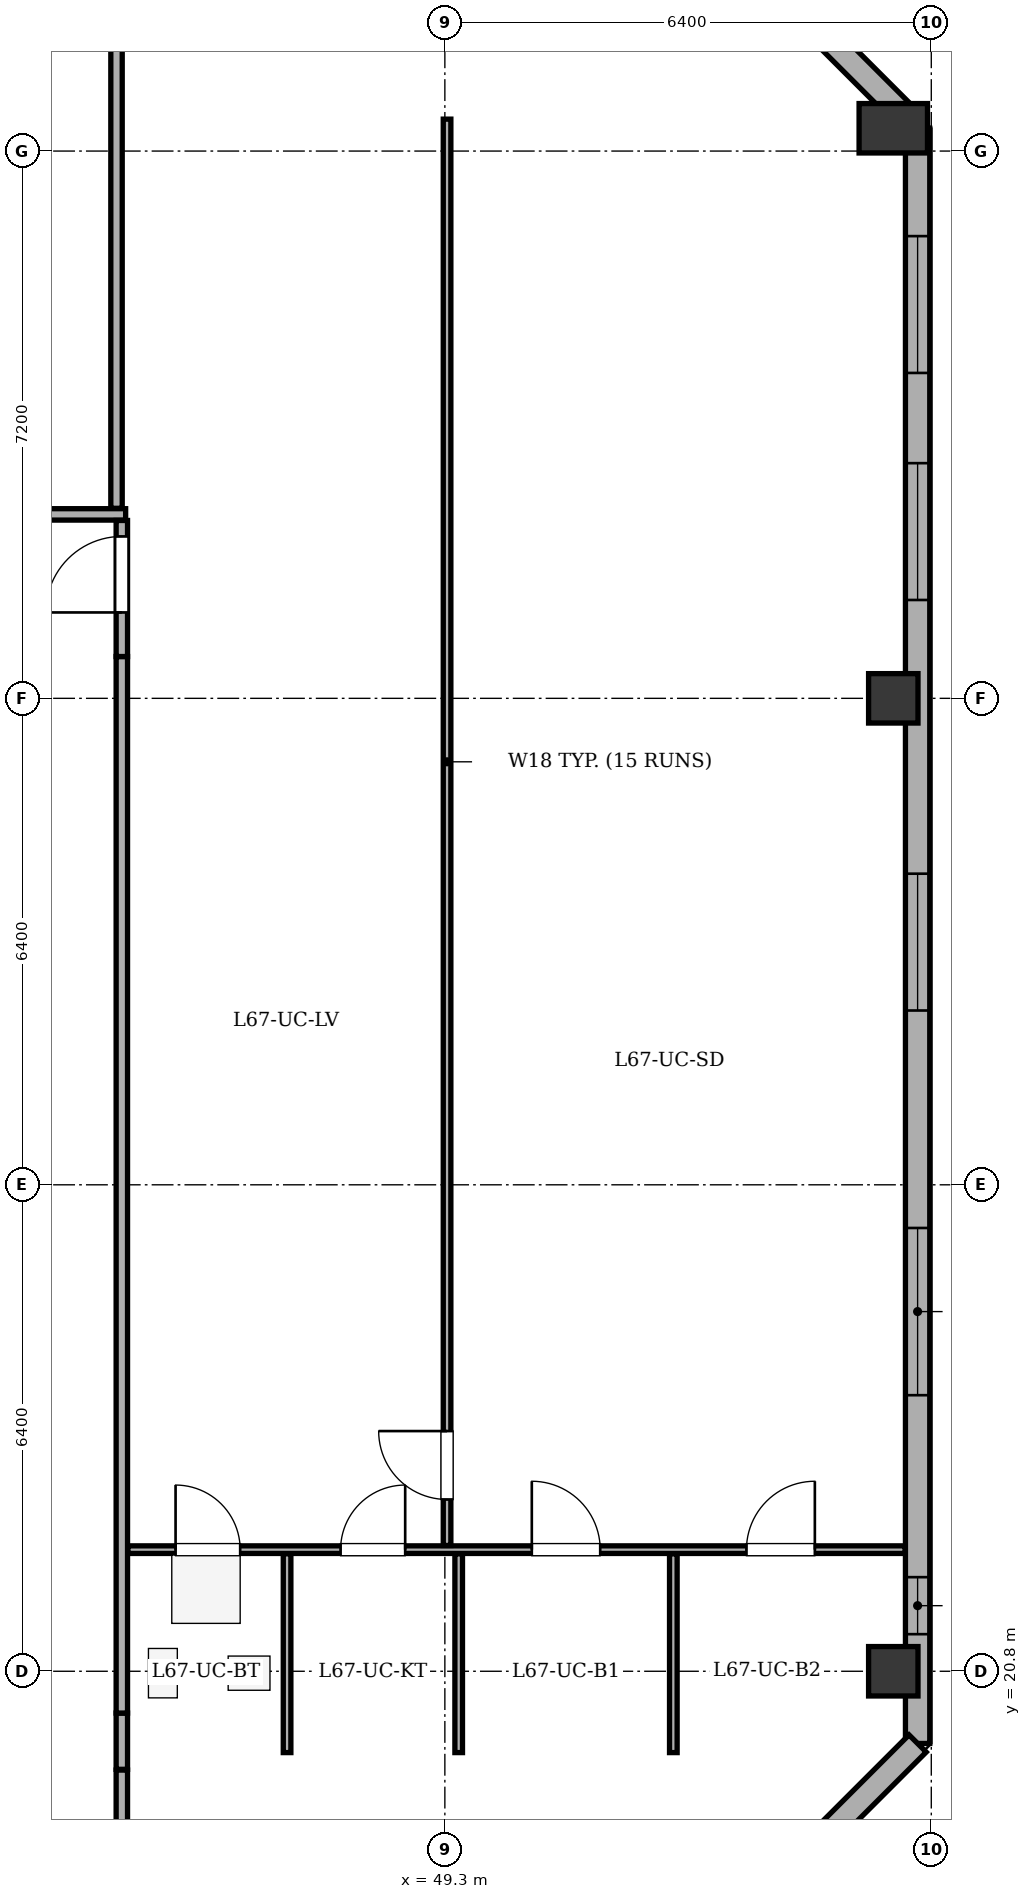
"""IFC4 building model, lengths in metres.
Left out: names, types, materials, properties, quantities, classifications, styles, units other than length and angle.
Written with IfcOpenShell. Run it as: python <this file> out.ifc"""

import sys

from ifc_helpers import new_model, si_unit, direction, frame, frame_2d, origin, origin_2d, place, context, subcontext, project, spatial, rectangle, extrude, element, fill, save


model = new_model("IFC4")
c1 = context("Model", 3, precision=1e-05, world=origin(), true_north=direction((0.0, 1.0)))
c2 = subcontext(c1, "Body", "Model", "MODEL_VIEW")
j1 = project(units=[si_unit("LENGTHUNIT", "METRE"), si_unit("PLANEANGLEUNIT", "RADIAN")], contexts=[c1])
p1 = place(None, origin())
s1 = spatial("IfcSite", under=j1, at=p1, CompositionType="ELEMENT")
p2 = place(p1, origin())
s2 = spatial("IfcBuilding", under=s1, at=p2, CompositionType="ELEMENT")
p3 = place(p2, frame((0.0, 0.0, 255.1)))
s3 = spatial("IfcBuildingStorey", under=s2, at=p3, CompositionType="ELEMENT", Elevation=255.1)
for number, where, z_axis, x_axis in (
    (1, (55.2, 20.8, 0.0), (0.0, 0.0, 1.0), (1.0, 0.0, 0.0)),
    (2, (55.2, 33.6, 0.0), (0.0, 0.0, 1.0), (1.0, 0.0, 0.0)),
):
    element("IfcColumn", number, at=place(p3, frame(where, z_axis=z_axis, x_axis=x_axis)), inside=s3, PredefinedType="COLUMN", context=c2, shape_type="SweptSolid", body=[
        extrude(rectangle(XDim=0.65, YDim=0.65, at=origin_2d()), origin(), (0.0, 0.0, 1.0), 3.4),
    ])
p4 = place(p3, frame((55.2, 41.1, 0.0), z_axis=(0.0, 0.0, 1.0), x_axis=(1.0, 0.0, 0.0)))
e3 = element("IfcColumn", 3, at=p4, inside=s3, PredefinedType="COLUMN", context=c2, shape_type="SweptSolid", body=[
    extrude(rectangle(XDim=0.65, YDim=0.9, at=origin_2d()), origin(), (0.0, 0.0, 1.0), 3.4),
])
p5 = place(p3, frame((51.7, 44.92, 0.0), z_axis=(0.0, 0.0, 1.0), x_axis=(0.70712937715, -0.707084184501, 0.0)))
e4 = element("IfcWall", 4, at=p5, inside=s3, PredefinedType="STANDARD", context=c2, shape_type="SweptSolid", body=[
    extrude(rectangle(XDim=5.402, YDim=0.32, at=frame_2d((2.701, 0.0))), origin(), (0.0, 0.0, 1.0), 2.725),
])
p6 = place(p5, frame((2.001, 0.0, 0.75)))
e5 = element("IfcOpeningElement", 5, at=p6, cuts=e4, PredefinedType="OPENING", context=c2, shape_type="SweptSolid", body=[
    extrude(rectangle(XDim=1.4, YDim=1.65, at=frame_2d((0.7, 0.825))), frame((0.0, 0.17, 0.0), z_axis=(0.0, -1.0, 0.0), x_axis=(1.0, 0.0, 0.0)), (0.0, 0.0, 1.0), 0.34),
])
p7 = place(p3, frame((55.52, 41.1, 0.0), z_axis=(0.0, 0.0, 1.0), x_axis=(0.0, -1.0, 0.0)))
e6 = element("IfcWall", 6, at=p7, inside=s3, PredefinedType="STANDARD", context=c2, shape_type="SweptSolid", body=[
    extrude(rectangle(XDim=21.25, YDim=0.32, at=frame_2d((10.625, 0.0))), origin(), (0.0, 0.0, 1.0), 2.725),
])
p8 = place(p7, frame((1.419, 0.0, 0.75)))
e7 = element("IfcOpeningElement", 7, at=p8, cuts=e6, PredefinedType="OPENING", context=c2, shape_type="SweptSolid", body=[
    extrude(rectangle(XDim=1.8, YDim=1.7, at=frame_2d((0.9, 0.85))), frame((0.0, 0.17, 0.0), z_axis=(0.0, -1.0, 0.0), x_axis=(1.0, 0.0, 0.0)), (0.0, 0.0, 1.0), 0.34),
])
p9 = place(p7, frame((4.406, 0.0, 0.75)))
e8 = element("IfcOpeningElement", 8, at=p9, cuts=e6, PredefinedType="OPENING", context=c2, shape_type="SweptSolid", body=[
    extrude(rectangle(XDim=1.8, YDim=1.7, at=frame_2d((0.9, 0.85))), frame((0.0, 0.17, 0.0), z_axis=(0.0, -1.0, 0.0), x_axis=(1.0, 0.0, 0.0)), (0.0, 0.0, 1.0), 0.34),
])
p10 = place(p7, frame((9.807, 0.0, 0.75)))
e9 = element("IfcOpeningElement", 9, at=p10, cuts=e6, PredefinedType="OPENING", context=c2, shape_type="SweptSolid", body=[
    extrude(rectangle(XDim=1.8, YDim=1.7, at=frame_2d((0.9, 0.85))), frame((0.0, 0.17, 0.0), z_axis=(0.0, -1.0, 0.0), x_axis=(1.0, 0.0, 0.0)), (0.0, 0.0, 1.0), 0.34),
])
p11 = place(p7, frame((14.468, 0.0, 0.75)))
e10 = element("IfcOpeningElement", 10, at=p11, cuts=e6, PredefinedType="OPENING", context=c2, shape_type="SweptSolid", body=[
    extrude(rectangle(XDim=2.2, YDim=1.7, at=frame_2d((1.1, 0.85))), frame((0.0, 0.17, 0.0), z_axis=(0.0, -1.0, 0.0), x_axis=(1.0, 0.0, 0.0)), (0.0, 0.0, 1.0), 0.34),
])
p12 = place(p7, frame((19.062, 0.0, 0.75)))
e11 = element("IfcOpeningElement", 11, at=p12, cuts=e6, PredefinedType="OPENING", context=c2, shape_type="SweptSolid", body=[
    extrude(rectangle(XDim=0.75, YDim=1.45, at=frame_2d((0.375, 0.725))), frame((0.0, 0.17, 0.0), z_axis=(0.0, -1.0, 0.0), x_axis=(1.0, 0.0, 0.0)), (0.0, 0.0, 1.0), 0.34),
])
p13 = place(p3, frame((55.52, 19.85, 0.0), z_axis=(0.0, 0.0, 1.0), x_axis=(-0.707106781187, -0.707106781187, 0.0)))
e12 = element("IfcWall", 12, at=p13, inside=s3, PredefinedType="STANDARD", context=c2, shape_type="SweptSolid", body=[
    extrude(rectangle(XDim=5.402, YDim=0.32, at=frame_2d((2.701, 0.0))), origin(), (0.0, 0.0, 1.0), 2.725),
])
p14 = place(p13, frame((2.001, 0.0, 0.75)))
e13 = element("IfcOpeningElement", 13, at=p14, cuts=e12, PredefinedType="OPENING", context=c2, shape_type="SweptSolid", body=[
    extrude(rectangle(XDim=1.4, YDim=1.65, at=frame_2d((0.7, 0.825))), frame((0.0, 0.17, 0.0), z_axis=(0.0, -1.0, 0.0), x_axis=(1.0, 0.0, 0.0)), (0.0, 0.0, 1.0), 0.34),
])
p15 = place(p3, frame((14.58, 36.02, 0.0), z_axis=(0.0, 0.0, 1.0), x_axis=(1.0, 0.0, 0.0)))
e14 = element("IfcWall", 14, at=p15, inside=s3, PredefinedType="PARTITIONING", context=c2, shape_type="SweptSolid", body=[
    extrude(rectangle(XDim=30.52, YDim=0.15, at=frame_2d((15.26, 0.0))), origin(), (0.0, 0.0, 1.0), 3.1),
])
p16 = place(p15, frame((6.585, 0.0, 0.0)))
e15 = element("IfcOpeningElement", 15, at=p16, cuts=e14, PredefinedType="OPENING", context=c2, shape_type="SweptSolid", body=[
    extrude(rectangle(XDim=1.0, YDim=2.1, at=frame_2d((0.5, 1.05))), frame((0.0, 0.085, 0.0), z_axis=(0.0, -1.0, 0.0), x_axis=(1.0, 0.0, 0.0)), (0.0, 0.0, 1.0), 0.17),
])
p17 = place(p15, frame((21.724, 0.0, 0.0)))
e16 = element("IfcOpeningElement", 16, at=p17, cuts=e14, PredefinedType="OPENING", context=c2, shape_type="SweptSolid", body=[
    extrude(rectangle(XDim=1.0, YDim=2.1, at=frame_2d((0.5, 1.05))), frame((0.0, 0.085, 0.0), z_axis=(0.0, -1.0, 0.0), x_axis=(1.0, 0.0, 0.0)), (0.0, 0.0, 1.0), 0.17),
])
p18 = place(p3, frame((44.98, 36.1, 0.0), z_axis=(0.0, 0.0, 1.0), x_axis=(0.0, 1.0, 0.0)))
e17 = element("IfcWall", 17, at=p18, inside=s3, PredefinedType="PARTITIONING", context=c2, shape_type="SweptSolid", body=[
    extrude(rectangle(XDim=8.655, YDim=0.15, at=frame_2d((4.327, 0.0))), origin(), (0.0, 0.0, 1.0), 2.725),
])
p19 = place(p3, frame((45.05, 19.5, 0.0), z_axis=(0.0, 0.0, 1.0), x_axis=(0.0, -1.0, 0.0)))
e18 = element("IfcWall", 18, at=p19, inside=s3, PredefinedType="PARTITIONING", context=c2, shape_type="SweptSolid", body=[
    extrude(rectangle(XDim=0.96, YDim=0.15, at=frame_2d((0.48, 0.0))), origin(), (0.0, 0.0, 1.0), 2.725),
])
p20 = place(p3, frame((45.05, 19.51, 0.0), z_axis=(0.0, 0.0, 1.0), x_axis=(0.0, 1.0, 0.0)))
e19 = element("IfcWall", 19, at=p20, inside=s3, PredefinedType="PARTITIONING", context=c2, shape_type="SweptSolid", body=[
    extrude(rectangle(XDim=0.74, YDim=0.15, at=frame_2d((0.37, 0.0))), origin(), (0.0, 0.0, 1.0), 2.725),
])
p21 = place(p3, frame((45.05, 20.25, 0.0), z_axis=(0.0, 0.0, 1.0), x_axis=(0.0, 1.0, 0.0)))
e20 = element("IfcWall", 20, at=p21, inside=s3, PredefinedType="PARTITIONING", context=c2, shape_type="SweptSolid", body=[
    extrude(rectangle(XDim=13.9, YDim=0.15, at=frame_2d((6.95, 0.0))), origin(), (0.0, 0.0, 1.0), 2.725),
])
p22 = place(p3, frame((45.05, 34.15, 0.0), z_axis=(0.0, 0.0, 1.0), x_axis=(0.0, 1.0, 0.0)))
e21 = element("IfcWall", 21, at=p22, inside=s3, PredefinedType="PARTITIONING", context=c2, shape_type="SweptSolid", body=[
    extrude(rectangle(XDim=1.79, YDim=0.15, at=frame_2d((0.895, 0.0))), origin(), (0.0, 0.0, 1.0), 2.725),
])
p23 = place(p22, frame((0.58, 0.0, 0.0)))
e22 = element("IfcOpeningElement", 22, at=p23, cuts=e21, PredefinedType="OPENING", context=c2, shape_type="SweptSolid", body=[
    extrude(rectangle(XDim=1.0, YDim=2.1, at=frame_2d((0.5, 1.05))), frame((0.0, 0.085, 0.0), z_axis=(0.0, -1.0, 0.0), x_axis=(1.0, 0.0, 0.0)), (0.0, 0.0, 1.0), 0.17),
])
p24 = place(p3, frame((45.13, 22.4, 0.0), z_axis=(0.0, 0.0, 1.0), x_axis=(1.0, 0.0, 0.0)))
e23 = element("IfcWall", 23, at=p24, inside=s3, PredefinedType="PARTITIONING", context=c2, shape_type="SweptSolid", body=[
    extrude(rectangle(XDim=10.225, YDim=0.1, at=frame_2d((5.113, 0.0))), origin(), (0.0, 0.0, 1.0), 3.1),
])
p25 = place(p24, frame((0.627, 0.0, 0.0)))
e24 = element("IfcOpeningElement", 24, at=p25, cuts=e23, PredefinedType="OPENING", context=c2, shape_type="SweptSolid", body=[
    extrude(rectangle(XDim=0.85, YDim=2.05, at=frame_2d((0.425, 1.025))), frame((0.0, 0.06, 0.0), z_axis=(0.0, -1.0, 0.0), x_axis=(1.0, 0.0, 0.0)), (0.0, 0.0, 1.0), 0.12),
])
p26 = place(p24, frame((2.798, 0.0, 0.0)))
e25 = element("IfcOpeningElement", 25, at=p26, cuts=e23, PredefinedType="OPENING", context=c2, shape_type="SweptSolid", body=[
    extrude(rectangle(XDim=0.85, YDim=2.05, at=frame_2d((0.425, 1.025))), frame((0.0, 0.06, 0.0), z_axis=(0.0, -1.0, 0.0), x_axis=(1.0, 0.0, 0.0)), (0.0, 0.0, 1.0), 0.12),
])
p27 = place(p24, frame((5.314, 0.0, 0.0)))
e26 = element("IfcOpeningElement", 26, at=p27, cuts=e23, PredefinedType="OPENING", context=c2, shape_type="SweptSolid", body=[
    extrude(rectangle(XDim=0.9, YDim=2.05, at=frame_2d((0.45, 1.025))), frame((0.0, 0.06, 0.0), z_axis=(0.0, -1.0, 0.0), x_axis=(1.0, 0.0, 0.0)), (0.0, 0.0, 1.0), 0.12),
])
p28 = place(p24, frame((8.138, 0.0, 0.0)))
e27 = element("IfcOpeningElement", 27, at=p28, cuts=e23, PredefinedType="OPENING", context=c2, shape_type="SweptSolid", body=[
    extrude(rectangle(XDim=0.9, YDim=2.05, at=frame_2d((0.45, 1.025))), frame((0.0, 0.06, 0.0), z_axis=(0.0, -1.0, 0.0), x_axis=(1.0, 0.0, 0.0)), (0.0, 0.0, 1.0), 0.12),
])
p29 = place(p3, frame((49.329, 22.455, 0.0), z_axis=(0.0, 0.0, 1.0), x_axis=(0.0, 1.0, 0.0)))
e28 = element("IfcWall", 28, at=p29, inside=s3, PredefinedType="PARTITIONING", context=c2, shape_type="SweptSolid", body=[
    extrude(rectangle(XDim=18.765, YDim=0.1, at=frame_2d((9.382, 0.0))), origin(), (0.0, 0.0, 1.0), 2.725),
])
p30 = place(p29, frame((0.605, 0.0, 0.0)))
e29 = element("IfcOpeningElement", 29, at=p30, cuts=e28, PredefinedType="OPENING", context=c2, shape_type="SweptSolid", body=[
    extrude(rectangle(XDim=0.9, YDim=2.05, at=frame_2d((0.45, 1.025))), frame((0.0, 0.06, 0.0), z_axis=(0.0, -1.0, 0.0), x_axis=(1.0, 0.0, 0.0)), (0.0, 0.0, 1.0), 0.12),
])
for number, where, z_axis, x_axis in (
    (30, (47.224, 19.73, 0.0), (0.0, 0.0, 1.0), (0.0, 1.0, 0.0)),
    (31, (49.482, 19.73, 0.0), (0.0, 0.0, 1.0), (0.0, 1.0, 0.0)),
):
    element("IfcWall", number, at=place(p3, frame(where, z_axis=z_axis, x_axis=x_axis)), inside=s3, PredefinedType="PARTITIONING", context=c2, shape_type="SweptSolid", body=[
        extrude(rectangle(XDim=2.615, YDim=0.1, at=frame_2d((1.308, 0.0))), origin(), (0.0, 0.0, 1.0), 2.725),
    ])
p31 = place(p3, frame((52.306, 19.73, 0.0), z_axis=(0.0, 0.0, 1.0), x_axis=(0.0, 1.0, 0.0)))
e32 = element("IfcWall", 32, at=p31, inside=s3, PredefinedType="PARTITIONING", context=c2, shape_type="SweptSolid", body=[
    extrude(rectangle(XDim=2.615, YDim=0.1, at=frame_2d((1.308, 0.0))), origin(), (0.0, 0.0, 1.0), 3.1),
])
p32 = place(p8, origin())
e33 = element("IfcWindow", 33, at=p32, inside=s3, PartitioningType="SINGLE_PANEL", PredefinedType="WINDOW", context=c2, shape_type="SweptSolid", body=[
    extrude(rectangle(XDim=1.8, YDim=1.7, at=frame_2d((0.9, 0.85))), frame((0.0, -0.01, 0.0), z_axis=(0.0, -1.0, 0.0), x_axis=(1.0, 0.0, 0.0)), (0.0, 0.0, 1.0), 0.06),
])
fill(e7, e33)
p33 = place(p9, origin())
e34 = element("IfcWindow", 34, at=p33, inside=s3, PartitioningType="SINGLE_PANEL", PredefinedType="WINDOW", context=c2, shape_type="SweptSolid", body=[
    extrude(rectangle(XDim=1.8, YDim=1.7, at=frame_2d((0.9, 0.85))), frame((0.0, -0.01, 0.0), z_axis=(0.0, -1.0, 0.0), x_axis=(1.0, 0.0, 0.0)), (0.0, 0.0, 1.0), 0.06),
])
fill(e8, e34)
p34 = place(p10, origin())
e35 = element("IfcWindow", 35, at=p34, inside=s3, PartitioningType="SINGLE_PANEL", PredefinedType="WINDOW", context=c2, shape_type="SweptSolid", body=[
    extrude(rectangle(XDim=1.8, YDim=1.7, at=frame_2d((0.9, 0.85))), frame((0.0, -0.01, 0.0), z_axis=(0.0, -1.0, 0.0), x_axis=(1.0, 0.0, 0.0)), (0.0, 0.0, 1.0), 0.06),
])
fill(e9, e35)
p35 = place(p11, origin())
e36 = element("IfcWindow", 36, at=p35, inside=s3, PartitioningType="SINGLE_PANEL", PredefinedType="WINDOW", context=c2, shape_type="SweptSolid", body=[
    extrude(rectangle(XDim=2.2, YDim=1.7, at=frame_2d((1.1, 0.85))), frame((0.0, -0.01, 0.0), z_axis=(0.0, -1.0, 0.0), x_axis=(1.0, 0.0, 0.0)), (0.0, 0.0, 1.0), 0.06),
])
fill(e10, e36)
p36 = place(p12, origin())
e37 = element("IfcWindow", 37, at=p36, inside=s3, PartitioningType="SINGLE_PANEL", PredefinedType="WINDOW", context=c2, shape_type="SweptSolid", body=[
    extrude(rectangle(XDim=0.75, YDim=1.45, at=frame_2d((0.375, 0.725))), frame((0.0, -0.01, 0.0), z_axis=(0.0, -1.0, 0.0), x_axis=(1.0, 0.0, 0.0)), (0.0, 0.0, 1.0), 0.06),
])
fill(e11, e37)
p37 = place(p23, origin())
e38 = element("IfcDoor", 38, at=p37, inside=s3, OperationType="SINGLE_SWING_LEFT", PredefinedType="DOOR", context=c2, shape_type="SweptSolid", body=[
    extrude(rectangle(XDim=1.0, YDim=2.1, at=frame_2d((0.5, 1.05))), frame((0.0, 0.025, 0.0), z_axis=(0.0, -1.0, 0.0), x_axis=(1.0, 0.0, 0.0)), (0.0, 0.0, 1.0), 0.05),
])
fill(e22, e38)
p38 = place(p30, origin())
e39 = element("IfcDoor", 39, at=p38, inside=s3, OperationType="SINGLE_SWING_RIGHT", PredefinedType="DOOR", context=c2, shape_type="SweptSolid", body=[
    extrude(rectangle(XDim=0.9, YDim=2.05, at=frame_2d((0.45, 1.025))), frame((0.0, 0.025, 0.0), z_axis=(0.0, -1.0, 0.0), x_axis=(1.0, 0.0, 0.0)), (0.0, 0.0, 1.0), 0.05),
])
fill(e29, e39)
p39 = place(p25, origin())
e40 = element("IfcDoor", 40, at=p39, inside=s3, OperationType="SINGLE_SWING_LEFT", PredefinedType="DOOR", context=c2, shape_type="SweptSolid", body=[
    extrude(rectangle(XDim=0.85, YDim=2.05, at=frame_2d((0.425, 1.025))), frame((0.0, 0.025, 0.0), z_axis=(0.0, -1.0, 0.0), x_axis=(1.0, 0.0, 0.0)), (0.0, 0.0, 1.0), 0.05),
])
fill(e24, e40)
p40 = place(p26, origin())
e41 = element("IfcDoor", 41, at=p40, inside=s3, OperationType="SINGLE_SWING_RIGHT", PredefinedType="DOOR", context=c2, shape_type="SweptSolid", body=[
    extrude(rectangle(XDim=0.85, YDim=2.05, at=frame_2d((0.425, 1.025))), frame((0.0, 0.025, 0.0), z_axis=(0.0, -1.0, 0.0), x_axis=(1.0, 0.0, 0.0)), (0.0, 0.0, 1.0), 0.05),
])
fill(e25, e41)
p41 = place(p27, origin())
e42 = element("IfcDoor", 42, at=p41, inside=s3, OperationType="SINGLE_SWING_LEFT", PredefinedType="DOOR", context=c2, shape_type="SweptSolid", body=[
    extrude(rectangle(XDim=0.9, YDim=2.05, at=frame_2d((0.45, 1.025))), frame((0.0, 0.025, 0.0), z_axis=(0.0, -1.0, 0.0), x_axis=(1.0, 0.0, 0.0)), (0.0, 0.0, 1.0), 0.05),
])
fill(e26, e42)
p42 = place(p28, origin())
e43 = element("IfcDoor", 43, at=p42, inside=s3, OperationType="SINGLE_SWING_RIGHT", PredefinedType="DOOR", context=c2, shape_type="SweptSolid", body=[
    extrude(rectangle(XDim=0.9, YDim=2.05, at=frame_2d((0.45, 1.025))), frame((0.0, 0.025, 0.0), z_axis=(0.0, -1.0, 0.0), x_axis=(1.0, 0.0, 0.0)), (0.0, 0.0, 1.0), 0.05),
])
fill(e27, e43)
save(model, sys.argv[1])
